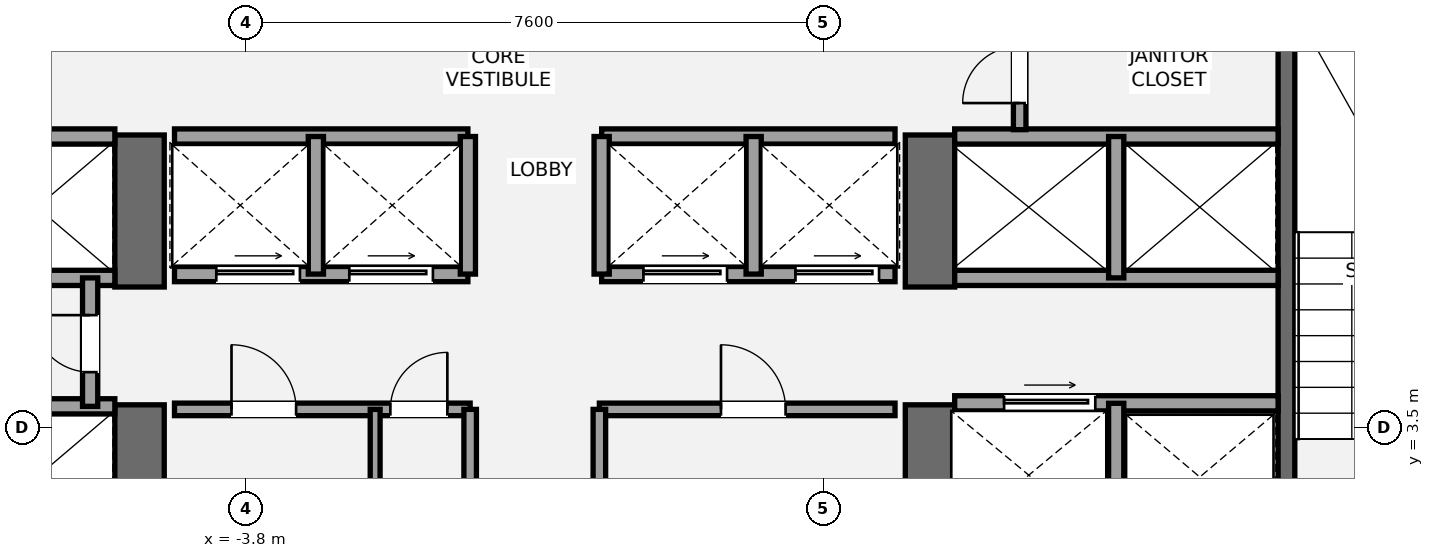
"""IFC4 building model, lengths in metres.
Left out: names, types, materials, properties, quantities, classifications, styles, units other than length and angle.
Written with IfcOpenShell. Run it as: python <this file> out.ifc"""

import sys

from ifc_helpers import new_model, si_unit, direction, frame, frame_2d, origin, place, context, subcontext, project, spatial, rectangle, extrude, element, fill, save


model = new_model("IFC4")
c1 = context("Model", 3, precision=1e-05, world=origin(), true_north=direction((0.0, 1.0)))
c2 = subcontext(c1, "Body", "Model", "MODEL_VIEW")
j1 = project(units=[si_unit("LENGTHUNIT", "METRE"), si_unit("PLANEANGLEUNIT", "RADIAN")], contexts=[c1])
p1 = place(None, origin())
s1 = spatial("IfcSite", under=j1, at=p1, CompositionType="ELEMENT")
p2 = place(p1, origin())
s2 = spatial("IfcBuilding", under=s1, at=p2, CompositionType="ELEMENT")
p3 = place(p2, frame((0.0, 0.0, 163.0)))
s3 = spatial("IfcBuildingStorey", under=s2, at=p3, CompositionType="ELEMENT", Elevation=163.0)
p4 = place(p3, frame((-5.2, 1.2, 0.0), z_axis=(0.0, 0.0, 1.0), x_axis=(0.0, 1.0, 0.0)))
e1 = element("IfcWall", 1, at=p4, inside=s3, PredefinedType="SHEAR", context=c2, shape_type="SweptSolid", body=[
    extrude(rectangle(XDim=2.6, YDim=0.65, at=frame_2d((1.3, 0.0))), origin(), (0.0, 0.0, 1.0), 3.2),
])
p5 = place(p3, frame((-5.2, 5.35, 0.0), z_axis=(0.0, 0.0, 1.0), x_axis=(0.0, 1.0, 0.0)))
e2 = element("IfcWall", 2, at=p5, inside=s3, PredefinedType="SHEAR", context=c2, shape_type="SweptSolid", body=[
    extrude(rectangle(XDim=2.0, YDim=0.65, at=frame_2d((1.0, 0.0))), origin(), (0.0, 0.0, 1.0), 3.2),
])
p6 = place(p3, frame((5.2, 1.2, 0.0), z_axis=(0.0, 0.0, 1.0), x_axis=(0.0, 1.0, 0.0)))
e3 = element("IfcWall", 3, at=p6, inside=s3, PredefinedType="SHEAR", context=c2, shape_type="SweptSolid", body=[
    extrude(rectangle(XDim=2.6, YDim=0.65, at=frame_2d((1.3, 0.0))), origin(), (0.0, 0.0, 1.0), 3.2),
])
p7 = place(p3, frame((5.2, 5.35, 0.0), z_axis=(0.0, 0.0, 1.0), x_axis=(0.0, 1.0, 0.0)))
e4 = element("IfcWall", 4, at=p7, inside=s3, PredefinedType="SHEAR", context=c2, shape_type="SweptSolid", body=[
    extrude(rectangle(XDim=2.0, YDim=0.65, at=frame_2d((1.0, 0.0))), origin(), (0.0, 0.0, 1.0), 3.2),
])
p8 = place(p3, frame((9.89, 1.85, 0.0), z_axis=(0.0, 0.0, 1.0), x_axis=(0.0, 1.0, 0.0)))
e5 = element("IfcWall", 5, at=p8, inside=s3, PredefinedType="SHEAR", context=c2, shape_type="SweptSolid", body=[
    extrude(rectangle(XDim=7.15, YDim=0.22, at=frame_2d((3.575, 0.0))), origin(), (0.0, 0.0, 1.0), 3.2),
])
for number, where, z_axis, x_axis in (
    (6, (-9.78, 3.78, 0.0), (0.0, 0.0, 1.0), (1.0, 0.0, 0.0)),
    (7, (-9.78, 5.47, 0.0), (0.0, 0.0, 1.0), (1.0, 0.0, 0.0)),
    (8, (-9.78, 7.33, 0.0), (0.0, 0.0, 1.0), (1.0, 0.0, 0.0)),
):
    element("IfcWall", number, at=place(p3, frame(where, z_axis=z_axis, x_axis=x_axis)), inside=s3, PredefinedType="SOLIDWALL", context=c2, shape_type="SweptSolid", body=[
        extrude(rectangle(XDim=4.255, YDim=0.2, at=frame_2d((2.127, 0.0))), origin(), (0.0, 0.0, 1.0), 3.02),
    ])
p9 = place(p3, frame((-5.85, 3.78, 0.0), z_axis=(0.0, 0.0, 1.0), x_axis=(0.0, 1.0, 0.0)))
e9 = element("IfcWall", 9, at=p9, inside=s3, PredefinedType="SOLIDWALL", context=c2, shape_type="SweptSolid", body=[
    extrude(rectangle(XDim=1.69, YDim=0.2, at=frame_2d((0.845, 0.0))), origin(), (0.0, 0.0, 1.0), 3.02),
])
p10 = place(p9, frame((0.45, 0.0, 0.0)))
e10 = element("IfcOpeningElement", 10, at=p10, cuts=e9, PredefinedType="OPENING", context=c2, shape_type="SweptSolid", body=[
    extrude(rectangle(XDim=0.75, YDim=2.1, at=frame_2d((0.375, 1.05))), frame((0.0, 0.11, 0.0), z_axis=(0.0, -1.0, 0.0), x_axis=(1.0, 0.0, 0.0)), (0.0, 0.0, 1.0), 0.22),
])
p11 = place(p3, frame((5.525, 3.82, 0.0), z_axis=(0.0, 0.0, 1.0), x_axis=(1.0, 0.0, 0.0)))
e11 = element("IfcWall", 11, at=p11, inside=s3, PredefinedType="SOLIDWALL", context=c2, shape_type="SweptSolid", body=[
    extrude(rectangle(XDim=4.255, YDim=0.2, at=frame_2d((2.127, 0.0))), origin(), (0.0, 0.0, 1.0), 3.02),
])
p12 = place(p11, frame((0.65, 0.0, 0.0)))
e12 = element("IfcOpeningElement", 12, at=p12, cuts=e11, PredefinedType="OPENING", context=c2, shape_type="SweptSolid", body=[
    extrude(rectangle(XDim=1.2, YDim=2.2, at=frame_2d((0.6, 1.1))), frame((0.0, 0.11, 0.0), z_axis=(0.0, -1.0, 0.0), x_axis=(1.0, 0.0, 0.0)), (0.0, 0.0, 1.0), 0.22),
])
p13 = place(p3, frame((7.65, 1.85, 0.0), z_axis=(0.0, 0.0, 1.0), x_axis=(0.0, 1.0, 0.0)))
e13 = element("IfcWall", 13, at=p13, inside=s3, PredefinedType="SOLIDWALL", context=c2, shape_type="SweptSolid", body=[
    extrude(rectangle(XDim=1.97, YDim=0.2, at=frame_2d((0.985, 0.0))), origin(), (0.0, 0.0, 1.0), 3.02),
])
for number, where, z_axis, x_axis in (
    (14, (5.525, 5.47, 0.0), (0.0, 0.0, 1.0), (1.0, 0.0, 0.0)),
    (15, (5.525, 7.33, 0.0), (0.0, 0.0, 1.0), (1.0, 0.0, 0.0)),
):
    element("IfcWall", number, at=place(p3, frame(where, z_axis=z_axis, x_axis=x_axis)), inside=s3, PredefinedType="SOLIDWALL", context=c2, shape_type="SweptSolid", body=[
        extrude(rectangle(XDim=4.255, YDim=0.2, at=frame_2d((2.127, 0.0))), origin(), (0.0, 0.0, 1.0), 3.02),
    ])
p14 = place(p3, frame((7.65, 5.47, 0.0), z_axis=(0.0, 0.0, 1.0), x_axis=(0.0, 1.0, 0.0)))
e16 = element("IfcWall", 16, at=p14, inside=s3, PredefinedType="SOLIDWALL", context=c2, shape_type="SweptSolid", body=[
    extrude(rectangle(XDim=1.86, YDim=0.2, at=frame_2d((0.93, 0.0))), origin(), (0.0, 0.0, 1.0), 3.02),
])
p15 = place(p3, frame((-4.74, 3.74, 0.0), z_axis=(0.0, 0.0, 1.0), x_axis=(1.0, 0.0, 0.0)))
e17 = element("IfcWall", 17, at=p15, inside=s3, PredefinedType="PARTITIONING", context=c2, shape_type="SweptSolid", body=[
    extrude(rectangle(XDim=3.89, YDim=0.165, at=frame_2d((1.945, 0.0))), origin(), (0.0, 0.0, 1.0), 3.02),
])
p16 = place(p15, frame((0.75, 0.0, 0.0)))
e18 = element("IfcOpeningElement", 18, at=p16, cuts=e17, PredefinedType="OPENING", context=c2, shape_type="SweptSolid", body=[
    extrude(rectangle(XDim=0.85, YDim=2.1, at=frame_2d((0.425, 1.05))), frame((0.0, 0.093, 0.0), z_axis=(0.0, -1.0, 0.0), x_axis=(1.0, 0.0, 0.0)), (0.0, 0.0, 1.0), 0.185),
])
p17 = place(p15, frame((2.84, 0.0, 0.0)))
e19 = element("IfcOpeningElement", 19, at=p17, cuts=e17, PredefinedType="OPENING", context=c2, shape_type="SweptSolid", body=[
    extrude(rectangle(XDim=0.75, YDim=2.1, at=frame_2d((0.375, 1.05))), frame((0.0, 0.093, 0.0), z_axis=(0.0, -1.0, 0.0), x_axis=(1.0, 0.0, 0.0)), (0.0, 0.0, 1.0), 0.185),
])
p18 = place(p3, frame((-0.85, 1.92, 0.0), z_axis=(0.0, 0.0, 1.0), x_axis=(0.0, 1.0, 0.0)))
e20 = element("IfcWall", 20, at=p18, inside=s3, PredefinedType="PARTITIONING", context=c2, shape_type="SweptSolid", body=[
    extrude(rectangle(XDim=1.82, YDim=0.165, at=frame_2d((0.91, 0.0))), origin(), (0.0, 0.0, 1.0), 3.02),
])
p19 = place(p3, frame((0.85, 3.74, 0.0), z_axis=(0.0, 0.0, 1.0), x_axis=(1.0, 0.0, 0.0)))
e21 = element("IfcWall", 21, at=p19, inside=s3, PredefinedType="PARTITIONING", context=c2, shape_type="SweptSolid", body=[
    extrude(rectangle(XDim=3.89, YDim=0.165, at=frame_2d((1.945, 0.0))), origin(), (0.0, 0.0, 1.0), 3.02),
])
p20 = place(p19, frame((1.6, 0.0, 0.0)))
e22 = element("IfcOpeningElement", 22, at=p20, cuts=e21, PredefinedType="OPENING", context=c2, shape_type="SweptSolid", body=[
    extrude(rectangle(XDim=0.85, YDim=2.1, at=frame_2d((0.425, 1.05))), frame((0.0, 0.093, 0.0), z_axis=(0.0, -1.0, 0.0), x_axis=(1.0, 0.0, 0.0)), (0.0, 0.0, 1.0), 0.185),
])
p21 = place(p3, frame((0.85, 1.92, 0.0), z_axis=(0.0, 0.0, 1.0), x_axis=(0.0, 1.0, 0.0)))
e23 = element("IfcWall", 23, at=p21, inside=s3, PredefinedType="PARTITIONING", context=c2, shape_type="SweptSolid", body=[
    extrude(rectangle(XDim=1.82, YDim=0.165, at=frame_2d((0.91, 0.0))), origin(), (0.0, 0.0, 1.0), 3.02),
])
p22 = place(p3, frame((-2.1, 1.92, 0.0), z_axis=(0.0, 0.0, 1.0), x_axis=(0.0, 1.0, 0.0)))
e24 = element("IfcWall", 24, at=p22, inside=s3, PredefinedType="PARTITIONING", context=c2, shape_type="SweptSolid", body=[
    extrude(rectangle(XDim=1.82, YDim=0.13, at=frame_2d((0.91, 0.0))), origin(), (0.0, 0.0, 1.0), 3.02),
])
p23 = place(p3, frame((-4.74, 5.52, 0.0), z_axis=(0.0, 0.0, 1.0), x_axis=(1.0, 0.0, 0.0)))
e25 = element("IfcWall", 25, at=p23, inside=s3, PredefinedType="SOLIDWALL", context=c2, shape_type="SweptSolid", body=[
    extrude(rectangle(XDim=3.86, YDim=0.2, at=frame_2d((1.93, 0.0))), origin(), (0.0, 0.0, 1.0), 3.02),
])
p24 = place(p23, frame((0.55, 0.0, 0.0)))
e26 = element("IfcOpeningElement", 26, at=p24, cuts=e25, PredefinedType="OPENING", context=c2, shape_type="SweptSolid", body=[
    extrude(rectangle(XDim=1.1, YDim=2.2, at=frame_2d((0.55, 1.1))), frame((0.0, 0.11, 0.0), z_axis=(0.0, -1.0, 0.0), x_axis=(1.0, 0.0, 0.0)), (0.0, 0.0, 1.0), 0.22),
])
p25 = place(p23, frame((2.3, 0.0, 0.0)))
e27 = element("IfcOpeningElement", 27, at=p25, cuts=e25, PredefinedType="OPENING", context=c2, shape_type="SweptSolid", body=[
    extrude(rectangle(XDim=1.1, YDim=2.2, at=frame_2d((0.55, 1.1))), frame((0.0, 0.11, 0.0), z_axis=(0.0, -1.0, 0.0), x_axis=(1.0, 0.0, 0.0)), (0.0, 0.0, 1.0), 0.22),
])
p26 = place(p3, frame((0.88, 5.52, 0.0), z_axis=(0.0, 0.0, 1.0), x_axis=(1.0, 0.0, 0.0)))
e28 = element("IfcWall", 28, at=p26, inside=s3, PredefinedType="SOLIDWALL", context=c2, shape_type="SweptSolid", body=[
    extrude(rectangle(XDim=3.86, YDim=0.2, at=frame_2d((1.93, 0.0))), origin(), (0.0, 0.0, 1.0), 3.02),
])
p27 = place(p26, frame((0.55, 0.0, 0.0)))
e29 = element("IfcOpeningElement", 29, at=p27, cuts=e28, PredefinedType="OPENING", context=c2, shape_type="SweptSolid", body=[
    extrude(rectangle(XDim=1.1, YDim=2.2, at=frame_2d((0.55, 1.1))), frame((0.0, 0.11, 0.0), z_axis=(0.0, -1.0, 0.0), x_axis=(1.0, 0.0, 0.0)), (0.0, 0.0, 1.0), 0.22),
])
p28 = place(p26, frame((2.55, 0.0, 0.0)))
e30 = element("IfcOpeningElement", 30, at=p28, cuts=e28, PredefinedType="OPENING", context=c2, shape_type="SweptSolid", body=[
    extrude(rectangle(XDim=1.1, YDim=2.2, at=frame_2d((0.55, 1.1))), frame((0.0, 0.11, 0.0), z_axis=(0.0, -1.0, 0.0), x_axis=(1.0, 0.0, 0.0)), (0.0, 0.0, 1.0), 0.22),
])
for number, where, z_axis, x_axis in (
    (31, (-4.74, 7.33, 0.0), (0.0, 0.0, 1.0), (1.0, 0.0, 0.0)),
    (32, (0.88, 7.33, 0.0), (0.0, 0.0, 1.0), (1.0, 0.0, 0.0)),
):
    element("IfcWall", number, at=place(p3, frame(where, z_axis=z_axis, x_axis=x_axis)), inside=s3, PredefinedType="SOLIDWALL", context=c2, shape_type="SweptSolid", body=[
        extrude(rectangle(XDim=3.86, YDim=0.2, at=frame_2d((1.93, 0.0))), origin(), (0.0, 0.0, 1.0), 3.02),
    ])
for number, where, z_axis, x_axis in (
    (33, (-2.88, 5.52, 0.0), (0.0, 0.0, 1.0), (0.0, 1.0, 0.0)),
    (34, (2.88, 5.52, 0.0), (0.0, 0.0, 1.0), (0.0, 1.0, 0.0)),
    (35, (-0.88, 5.52, 0.0), (0.0, 0.0, 1.0), (0.0, 1.0, 0.0)),
    (36, (0.88, 5.52, 0.0), (0.0, 0.0, 1.0), (0.0, 1.0, 0.0)),
):
    element("IfcWall", number, at=place(p3, frame(where, z_axis=z_axis, x_axis=x_axis)), inside=s3, PredefinedType="SOLIDWALL", context=c2, shape_type="SweptSolid", body=[
        extrude(rectangle(XDim=1.81, YDim=0.2, at=frame_2d((0.905, 0.0))), origin(), (0.0, 0.0, 1.0), 3.02),
    ])
p29 = place(p3, frame((6.38, 7.42, 0.0), z_axis=(0.0, 0.0, 1.0), x_axis=(0.0, 1.0, 0.0)))
e37 = element("IfcWall", 37, at=p29, inside=s3, PredefinedType="PARTITIONING", context=c2, shape_type="SweptSolid", body=[
    extrude(rectangle(XDim=1.58, YDim=0.165, at=frame_2d((0.79, 0.0))), origin(), (0.0, 0.0, 1.0), 3.02),
])
p30 = place(p29, frame((0.35, 0.0, 0.0)))
e38 = element("IfcOpeningElement", 38, at=p30, cuts=e37, PredefinedType="OPENING", context=c2, shape_type="SweptSolid", body=[
    extrude(rectangle(XDim=0.75, YDim=2.1, at=frame_2d((0.375, 1.05))), frame((0.0, 0.093, 0.0), z_axis=(0.0, -1.0, 0.0), x_axis=(1.0, 0.0, 0.0)), (0.0, 0.0, 1.0), 0.185),
])
p31 = place(p10, origin())
e39 = element("IfcDoor", 39, at=p31, inside=s3, OperationType="SINGLE_SWING_RIGHT", PredefinedType="DOOR", context=c2, shape_type="SweptSolid", body=[
    extrude(rectangle(XDim=0.75, YDim=2.1, at=frame_2d((0.375, 1.05))), frame((0.0, 0.025, 0.0), z_axis=(0.0, -1.0, 0.0), x_axis=(1.0, 0.0, 0.0)), (0.0, 0.0, 1.0), 0.05),
])
fill(e10, e39)
p32 = place(p12, origin())
e40 = element("IfcDoor", 40, at=p32, inside=s3, OperationType="SLIDING_TO_RIGHT", PredefinedType="DOOR", context=c2, shape_type="SweptSolid", body=[
    extrude(rectangle(XDim=1.2, YDim=2.2, at=frame_2d((0.6, 1.1))), frame((0.0, 0.025, 0.0), z_axis=(0.0, -1.0, 0.0), x_axis=(1.0, 0.0, 0.0)), (0.0, 0.0, 1.0), 0.05),
])
fill(e12, e40)
p33 = place(p16, origin())
e41 = element("IfcDoor", 41, at=p33, inside=s3, OperationType="SINGLE_SWING_LEFT", PredefinedType="DOOR", context=c2, shape_type="SweptSolid", body=[
    extrude(rectangle(XDim=0.85, YDim=2.1, at=frame_2d((0.425, 1.05))), frame((0.0, 0.025, 0.0), z_axis=(0.0, -1.0, 0.0), x_axis=(1.0, 0.0, 0.0)), (0.0, 0.0, 1.0), 0.05),
])
fill(e18, e41)
p34 = place(p17, origin())
e42 = element("IfcDoor", 42, at=p34, inside=s3, OperationType="SINGLE_SWING_RIGHT", PredefinedType="DOOR", context=c2, shape_type="SweptSolid", body=[
    extrude(rectangle(XDim=0.75, YDim=2.1, at=frame_2d((0.375, 1.05))), frame((0.0, 0.025, 0.0), z_axis=(0.0, -1.0, 0.0), x_axis=(1.0, 0.0, 0.0)), (0.0, 0.0, 1.0), 0.05),
])
fill(e19, e42)
p35 = place(p20, origin())
e43 = element("IfcDoor", 43, at=p35, inside=s3, OperationType="SINGLE_SWING_LEFT", PredefinedType="DOOR", context=c2, shape_type="SweptSolid", body=[
    extrude(rectangle(XDim=0.85, YDim=2.1, at=frame_2d((0.425, 1.05))), frame((0.0, 0.025, 0.0), z_axis=(0.0, -1.0, 0.0), x_axis=(1.0, 0.0, 0.0)), (0.0, 0.0, 1.0), 0.05),
])
fill(e22, e43)
p36 = place(p24, origin())
e44 = element("IfcDoor", 44, at=p36, inside=s3, OperationType="SLIDING_TO_LEFT", PredefinedType="DOOR", context=c2, shape_type="SweptSolid", body=[
    extrude(rectangle(XDim=1.1, YDim=2.2, at=frame_2d((0.55, 1.1))), frame((0.0, 0.025, 0.0), z_axis=(0.0, -1.0, 0.0), x_axis=(1.0, 0.0, 0.0)), (0.0, 0.0, 1.0), 0.05),
])
fill(e26, e44)
p37 = place(p25, origin())
e45 = element("IfcDoor", 45, at=p37, inside=s3, OperationType="SLIDING_TO_LEFT", PredefinedType="DOOR", context=c2, shape_type="SweptSolid", body=[
    extrude(rectangle(XDim=1.1, YDim=2.2, at=frame_2d((0.55, 1.1))), frame((0.0, 0.025, 0.0), z_axis=(0.0, -1.0, 0.0), x_axis=(1.0, 0.0, 0.0)), (0.0, 0.0, 1.0), 0.05),
])
fill(e27, e45)
p38 = place(p27, origin())
e46 = element("IfcDoor", 46, at=p38, inside=s3, OperationType="SLIDING_TO_LEFT", PredefinedType="DOOR", context=c2, shape_type="SweptSolid", body=[
    extrude(rectangle(XDim=1.1, YDim=2.2, at=frame_2d((0.55, 1.1))), frame((0.0, 0.025, 0.0), z_axis=(0.0, -1.0, 0.0), x_axis=(1.0, 0.0, 0.0)), (0.0, 0.0, 1.0), 0.05),
])
fill(e29, e46)
p39 = place(p28, origin())
e47 = element("IfcDoor", 47, at=p39, inside=s3, OperationType="SLIDING_TO_LEFT", PredefinedType="DOOR", context=c2, shape_type="SweptSolid", body=[
    extrude(rectangle(XDim=1.1, YDim=2.2, at=frame_2d((0.55, 1.1))), frame((0.0, 0.025, 0.0), z_axis=(0.0, -1.0, 0.0), x_axis=(1.0, 0.0, 0.0)), (0.0, 0.0, 1.0), 0.05),
])
fill(e30, e47)
p40 = place(p30, origin())
e48 = element("IfcDoor", 48, at=p40, inside=s3, OperationType="SINGLE_SWING_LEFT", PredefinedType="DOOR", context=c2, shape_type="SweptSolid", body=[
    extrude(rectangle(XDim=0.75, YDim=2.1, at=frame_2d((0.375, 1.05))), frame((0.0, 0.025, 0.0), z_axis=(0.0, -1.0, 0.0), x_axis=(1.0, 0.0, 0.0)), (0.0, 0.0, 1.0), 0.05),
])
fill(e38, e48)
save(model, sys.argv[1])
